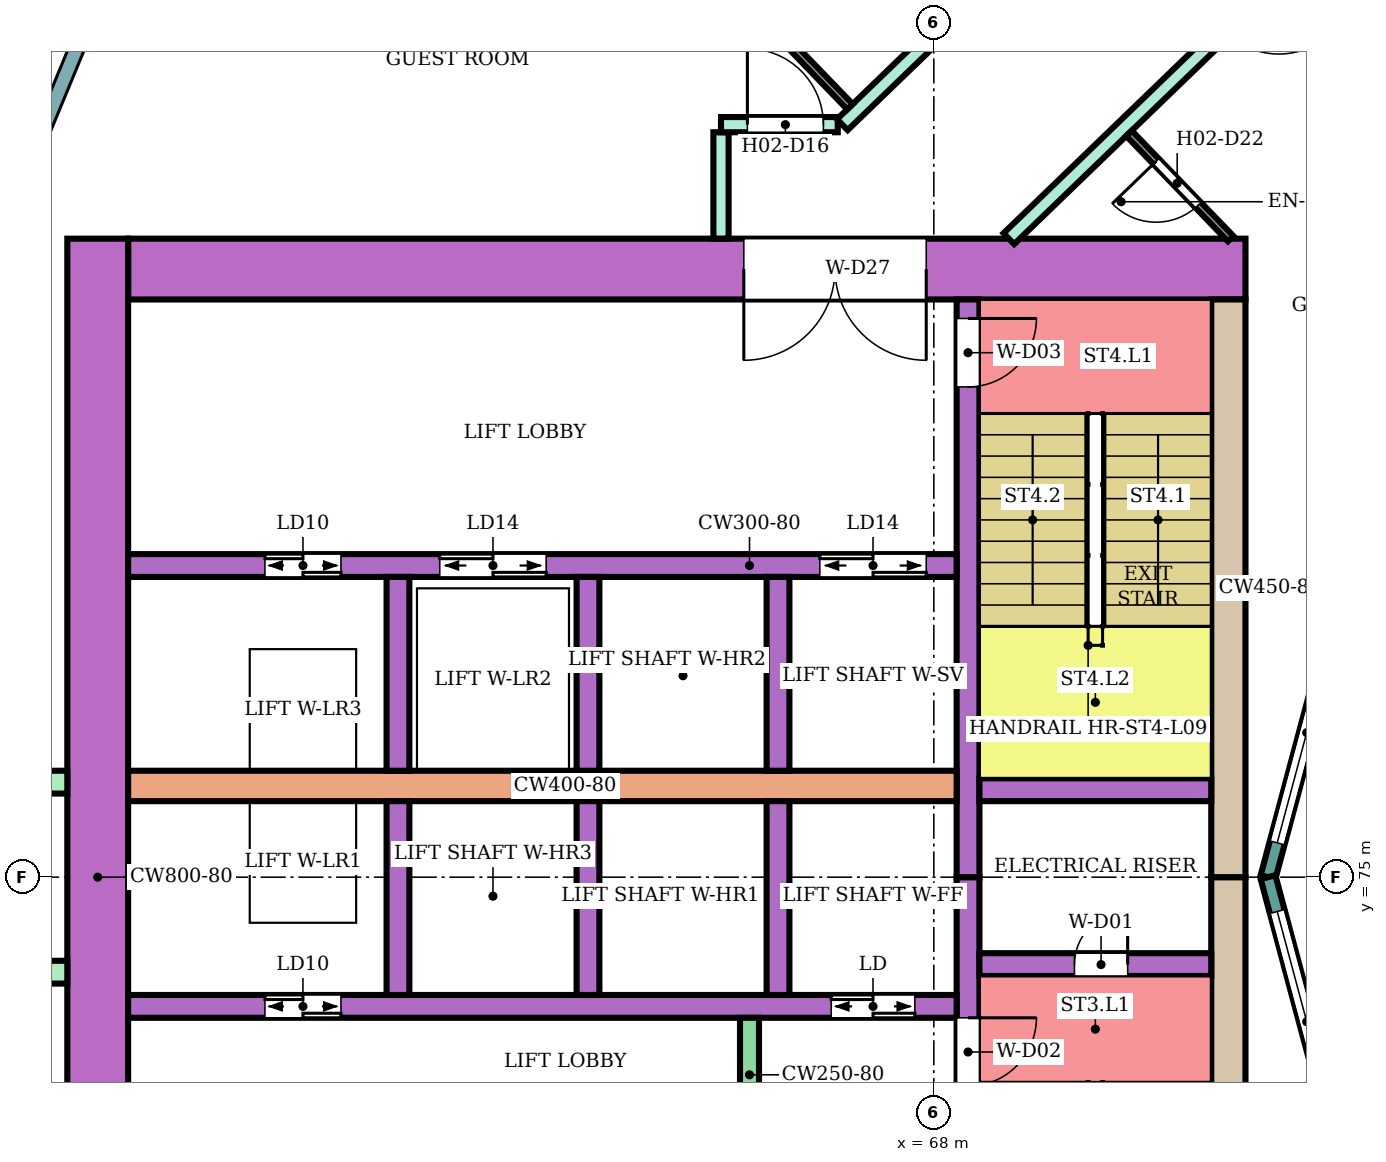
"""IFC4 building model, lengths in metres.
Left out: names, types, materials, properties, quantities, classifications, styles, units other than length and angle.
Written with IfcOpenShell. Run it as: python <this file> out.ifc"""

import sys

from ifc_helpers import new_model, si_unit, direction, frame, frame_2d, origin, place, context, subcontext, project, spatial, rectangle, extrude, element, fill, save


model = new_model("IFC4")
c1 = context("Model", 3, precision=1e-05, world=origin(), true_north=direction((0.0, 1.0)))
c2 = subcontext(c1, "Body", "Model", "MODEL_VIEW")
j1 = project(units=[si_unit("LENGTHUNIT", "METRE"), si_unit("PLANEANGLEUNIT", "RADIAN")], contexts=[c1])
p1 = place(None, origin())
s1 = spatial("IfcSite", under=j1, at=p1, CompositionType="ELEMENT")
p2 = place(p1, origin())
s2 = spatial("IfcBuilding", under=s1, at=p2, CompositionType="ELEMENT")
p3 = place(p2, frame((0.0, 0.0, 44.0)))
s3 = spatial("IfcBuildingStorey", under=s2, at=p3, CompositionType="ELEMENT", Elevation=44.0)
p4 = place(p3, frame((72.1, 83.0, 0.0), z_axis=(0.0, 0.0, 1.0), x_axis=(-1.0, 0.0, 0.0)))
e1 = element("IfcWall", 1, at=p4, inside=s3, PredefinedType="SHEAR", context=c2, shape_type="SweptSolid", body=[
    extrude(rectangle(XDim=14.7, YDim=0.8, at=frame_2d((7.35, 0.0))), origin(), (0.0, 0.0, 1.0), 3.48),
])
p5 = place(p4, frame((4.2, 0.0, 0.0)))
e2 = element("IfcOpeningElement", 2, at=p5, cuts=e1, PredefinedType="OPENING", context=c2, shape_type="SweptSolid", body=[
    extrude(rectangle(XDim=2.4, YDim=2.4, at=frame_2d((1.2, 1.2))), frame((0.0, 0.41, 0.0), z_axis=(0.0, -1.0, 0.0), x_axis=(1.0, 0.0, 0.0)), (0.0, 0.0, 1.0), 0.82),
])
for number, where, z_axis, x_axis in (
    (3, (71.875, 75.0, 0.0), (0.0, 0.0, 1.0), (0.0, -1.0, 0.0)),
    (4, (71.875, 82.6, 0.0), (0.0, 0.0, 1.0), (0.0, -1.0, 0.0)),
):
    element("IfcWall", number, at=place(p3, frame(where, z_axis=z_axis, x_axis=x_axis)), inside=s3, PredefinedType="SHEAR", context=c2, shape_type="SweptSolid", body=[
        extrude(rectangle(XDim=7.6, YDim=0.45, at=frame_2d((3.8, 0.0))), origin(), (0.0, 0.0, 1.0), 3.48),
    ])
p6 = place(p3, frame((57.0, 83.4, 0.0), z_axis=(0.0, 0.0, 1.0), x_axis=(0.0, -1.0, 0.0)))
e5 = element("IfcWall", 5, at=p6, inside=s3, PredefinedType="SHEAR", context=c2, shape_type="SweptSolid", body=[
    extrude(rectangle(XDim=16.8, YDim=0.8, at=frame_2d((8.4, 0.0))), origin(), (0.0, 0.0, 1.0), 3.48),
])
p7 = place(p3, frame((68.45, 75.0, 0.0), z_axis=(0.0, 0.0, 1.0), x_axis=(0.0, -1.0, 0.0)))
e6 = element("IfcWall", 6, at=p7, inside=s3, PredefinedType="SHEAR", context=c2, shape_type="SweptSolid", body=[
    extrude(rectangle(XDim=7.6, YDim=0.3, at=frame_2d((3.8, 0.0))), origin(), (0.0, 0.0, 1.0), 3.48),
])
p8 = place(p7, frame((1.85, 0.0, 0.0)))
e7 = element("IfcOpeningElement", 7, at=p8, cuts=e6, PredefinedType="OPENING", context=c2, shape_type="SweptSolid", body=[
    extrude(rectangle(XDim=0.9, YDim=2.1, at=frame_2d((0.45, 1.05))), frame((0.0, 0.16, 0.0), z_axis=(0.0, -1.0, 0.0), x_axis=(1.0, 0.0, 0.0)), (0.0, 0.0, 1.0), 0.32),
])
p9 = place(p3, frame((68.45, 82.6, 0.0), z_axis=(0.0, 0.0, 1.0), x_axis=(0.0, -1.0, 0.0)))
e8 = element("IfcWall", 8, at=p9, inside=s3, PredefinedType="SHEAR", context=c2, shape_type="SweptSolid", body=[
    extrude(rectangle(XDim=7.6, YDim=0.3, at=frame_2d((3.8, 0.0))), origin(), (0.0, 0.0, 1.0), 3.48),
])
p10 = place(p9, frame((0.25, 0.0, 0.0)))
e9 = element("IfcOpeningElement", 9, at=p10, cuts=e8, PredefinedType="OPENING", context=c2, shape_type="SweptSolid", body=[
    extrude(rectangle(XDim=0.9, YDim=2.1, at=frame_2d((0.45, 1.05))), frame((0.0, 0.16, 0.0), z_axis=(0.0, -1.0, 0.0), x_axis=(1.0, 0.0, 0.0)), (0.0, 0.0, 1.0), 0.32),
])
p11 = place(p3, frame((71.65, 73.85, 0.0), z_axis=(0.0, 0.0, 1.0), x_axis=(-1.0, 0.0, 0.0)))
e10 = element("IfcWall", 10, at=p11, inside=s3, PredefinedType="SHEAR", context=c2, shape_type="SweptSolid", body=[
    extrude(rectangle(XDim=3.05, YDim=0.3, at=frame_2d((1.525, 0.0))), origin(), (0.0, 0.0, 1.0), 3.48),
])
p12 = place(p11, frame((1.1, 0.0, 0.0)))
e11 = element("IfcOpeningElement", 11, at=p12, cuts=e10, PredefinedType="OPENING", context=c2, shape_type="SweptSolid", body=[
    extrude(rectangle(XDim=0.7, YDim=2.0, at=frame_2d((0.35, 1.0))), frame((0.0, 0.16, 0.0), z_axis=(0.0, -1.0, 0.0), x_axis=(1.0, 0.0, 0.0)), (0.0, 0.0, 1.0), 0.32),
])
p13 = place(p3, frame((71.65, 76.15, 0.0), z_axis=(0.0, 0.0, 1.0), x_axis=(-1.0, 0.0, 0.0)))
e12 = element("IfcWall", 12, at=p13, inside=s3, PredefinedType="SHEAR", context=c2, shape_type="SweptSolid", body=[
    extrude(rectangle(XDim=3.05, YDim=0.3, at=frame_2d((1.525, 0.0))), origin(), (0.0, 0.0, 1.0), 3.48),
])
p14 = place(p3, frame((68.3, 73.3, 0.0), z_axis=(0.0, 0.0, 1.0), x_axis=(-1.0, 0.0, 0.0)))
e13 = element("IfcWall", 13, at=p14, inside=s3, PredefinedType="SHEAR", context=c2, shape_type="SweptSolid", body=[
    extrude(rectangle(XDim=10.9, YDim=0.3, at=frame_2d((5.45, 0.0))), origin(), (0.0, 0.0, 1.0), 3.48),
])
p15 = place(p14, frame((0.55, 0.0, 0.0)))
e14 = element("IfcOpeningElement", 14, at=p15, cuts=e13, PredefinedType="OPENING", context=c2, shape_type="SweptSolid", body=[
    extrude(rectangle(XDim=1.1, YDim=2.1, at=frame_2d((0.55, 1.05))), frame((0.0, 0.16, 0.0), z_axis=(0.0, -1.0, 0.0), x_axis=(1.0, 0.0, 0.0)), (0.0, 0.0, 1.0), 0.32),
])
p16 = place(p14, frame((8.1, 0.0, 0.0)))
e15 = element("IfcOpeningElement", 15, at=p16, cuts=e13, PredefinedType="OPENING", context=c2, shape_type="SweptSolid", body=[
    extrude(rectangle(XDim=1.0, YDim=2.1, at=frame_2d((0.5, 1.05))), frame((0.0, 0.16, 0.0), z_axis=(0.0, -1.0, 0.0), x_axis=(1.0, 0.0, 0.0)), (0.0, 0.0, 1.0), 0.32),
])
p17 = place(p3, frame((68.3, 76.2, 0.0), z_axis=(0.0, 0.0, 1.0), x_axis=(-1.0, 0.0, 0.0)))
e16 = element("IfcWall", 16, at=p17, inside=s3, PredefinedType="SHEAR", context=c2, shape_type="SweptSolid", body=[
    extrude(rectangle(XDim=10.9, YDim=0.4, at=frame_2d((5.45, 0.0))), origin(), (0.0, 0.0, 1.0), 3.48),
])
p18 = place(p3, frame((68.3, 79.1, 0.0), z_axis=(0.0, 0.0, 1.0), x_axis=(-1.0, 0.0, 0.0)))
e17 = element("IfcWall", 17, at=p18, inside=s3, PredefinedType="SHEAR", context=c2, shape_type="SweptSolid", body=[
    extrude(rectangle(XDim=10.9, YDim=0.3, at=frame_2d((5.45, 0.0))), origin(), (0.0, 0.0, 1.0), 3.48),
])
p19 = place(p18, frame((0.4, 0.0, 0.0)))
e18 = element("IfcOpeningElement", 18, at=p19, cuts=e17, PredefinedType="OPENING", context=c2, shape_type="SweptSolid", body=[
    extrude(rectangle(XDim=1.4, YDim=2.1, at=frame_2d((0.7, 1.05))), frame((0.0, 0.16, 0.0), z_axis=(0.0, -1.0, 0.0), x_axis=(1.0, 0.0, 0.0)), (0.0, 0.0, 1.0), 0.32),
])
p20 = place(p18, frame((5.4, 0.0, 0.0)))
e19 = element("IfcOpeningElement", 19, at=p20, cuts=e17, PredefinedType="OPENING", context=c2, shape_type="SweptSolid", body=[
    extrude(rectangle(XDim=1.4, YDim=2.1, at=frame_2d((0.7, 1.05))), frame((0.0, 0.16, 0.0), z_axis=(0.0, -1.0, 0.0), x_axis=(1.0, 0.0, 0.0)), (0.0, 0.0, 1.0), 0.32),
])
p21 = place(p18, frame((8.1, 0.0, 0.0)))
e20 = element("IfcOpeningElement", 20, at=p21, cuts=e17, PredefinedType="OPENING", context=c2, shape_type="SweptSolid", body=[
    extrude(rectangle(XDim=1.0, YDim=2.1, at=frame_2d((0.5, 1.05))), frame((0.0, 0.16, 0.0), z_axis=(0.0, -1.0, 0.0), x_axis=(1.0, 0.0, 0.0)), (0.0, 0.0, 1.0), 0.32),
])
for number, where, z_axis, x_axis in (
    (21, (65.95, 76.0, 0.0), (0.0, 0.0, 1.0), (0.0, -1.0, 0.0)),
    (22, (63.45, 76.0, 0.0), (0.0, 0.0, 1.0), (0.0, -1.0, 0.0)),
    (23, (60.95, 76.0, 0.0), (0.0, 0.0, 1.0), (0.0, -1.0, 0.0)),
    (24, (65.95, 78.95, 0.0), (0.0, 0.0, 1.0), (0.0, -1.0, 0.0)),
    (25, (63.45, 78.95, 0.0), (0.0, 0.0, 1.0), (0.0, -1.0, 0.0)),
    (26, (60.95, 78.95, 0.0), (0.0, 0.0, 1.0), (0.0, -1.0, 0.0)),
):
    element("IfcWall", number, at=place(p3, frame(where, z_axis=z_axis, x_axis=x_axis)), inside=s3, PredefinedType="SHEAR", context=c2, shape_type="SweptSolid", body=[
        extrude(rectangle(XDim=2.55, YDim=0.3, at=frame_2d((1.275, 0.0))), origin(), (0.0, 0.0, 1.0), 3.48),
    ])
p22 = place(p3, frame((65.575, 73.15, 0.0), z_axis=(0.0, 0.0, 1.0), x_axis=(0.0, -1.0, 0.0)))
e27 = element("IfcWall", 27, at=p22, inside=s3, PredefinedType="SHEAR", context=c2, shape_type="SweptSolid", body=[
    extrude(rectangle(XDim=1.5, YDim=0.25, at=frame_2d((0.75, 0.0))), origin(), (0.0, 0.0, 1.0), 3.48),
])
for number, where, z_axis, x_axis in (
    (28, (56.6, 76.25, 0.0), (0.0, 0.0, 1.0), (-1.0, 0.0, 0.0)),
    (29, (56.6, 73.75, 0.0), (0.0, 0.0, 1.0), (-1.0, 0.0, 0.0)),
):
    element("IfcWall", number, at=place(p3, frame(where, z_axis=z_axis, x_axis=x_axis)), inside=s3, PredefinedType="NOTDEFINED", context=c2, shape_type="SweptSolid", body=[
        extrude(rectangle(XDim=2.416, YDim=0.3, at=frame_2d((1.208, 0.0))), origin(), (0.0, 0.0, 1.0), 3.8),
    ])
p23 = place(p3, frame((73.415, 78.802, 0.0), z_axis=(0.0, 0.0, 1.0), x_axis=(-0.258789828301, -0.965933654434, 0.0)))
e30 = element("IfcWall", 30, at=p23, inside=s3, PredefinedType="NOTDEFINED", context=c2, shape_type="SweptSolid", body=[
    extrude(rectangle(XDim=3.936, YDim=0.2, at=frame_2d((1.968, 0.0))), origin(), (0.0, 0.0, 1.0), 3.8),
])
p24 = place(p23, frame((0.468, 0.0, 0.9)))
e31 = element("IfcOpeningElement", 31, at=p24, cuts=e30, PredefinedType="OPENING", context=c2, shape_type="SweptSolid", body=[
    extrude(rectangle(XDim=3.0, YDim=2.3, at=frame_2d((1.5, 1.15))), frame((0.0, 0.11, 0.0), z_axis=(0.0, -1.0, 0.0), x_axis=(1.0, 0.0, 0.0)), (0.0, 0.0, 1.0), 0.22),
])
p25 = place(p3, frame((72.396, 75.0, 0.0), z_axis=(0.0, 0.0, 1.0), x_axis=(0.258789828301, -0.965933654434, 0.0)))
e32 = element("IfcWall", 32, at=p25, inside=s3, PredefinedType="NOTDEFINED", context=c2, shape_type="SweptSolid", body=[
    extrude(rectangle(XDim=3.936, YDim=0.2, at=frame_2d((1.968, 0.0))), origin(), (0.0, 0.0, 1.0), 3.8),
])
p26 = place(p25, frame((0.468, 0.0, 0.9)))
e33 = element("IfcOpeningElement", 33, at=p26, cuts=e32, PredefinedType="OPENING", context=c2, shape_type="SweptSolid", body=[
    extrude(rectangle(XDim=3.0, YDim=2.3, at=frame_2d((1.5, 1.15))), frame((0.0, 0.11, 0.0), z_axis=(0.0, -1.0, 0.0), x_axis=(1.0, 0.0, 0.0)), (0.0, 0.0, 1.0), 0.22),
])
p27 = place(p3, frame((65.2, 83.401, 0.0), z_axis=(0.0, 0.0, 1.0), x_axis=(0.0, 1.0, 0.0)))
e34 = element("IfcWall", 34, at=p27, inside=s3, PredefinedType="PARTITIONING", context=c2, shape_type="SweptSolid", body=[
    extrude(rectangle(XDim=1.399, YDim=0.2, at=frame_2d((0.7, 0.0))), origin(), (0.0, 0.0, 1.0), 3.35),
])
p28 = place(p3, frame((65.2, 84.9, 0.0), z_axis=(0.0, 0.0, 1.0), x_axis=(1.0, 0.0, 0.0)))
e35 = element("IfcWall", 35, at=p28, inside=s3, PredefinedType="PARTITIONING", context=c2, shape_type="SweptSolid", body=[
    extrude(rectangle(XDim=1.536, YDim=0.2, at=frame_2d((0.768, 0.0))), origin(), (0.0, 0.0, 1.0), 3.35),
])
p29 = place(p28, frame((0.347, 0.0, 0.0)))
e36 = element("IfcOpeningElement", 36, at=p29, cuts=e35, PredefinedType="OPENING", context=c2, shape_type="SweptSolid", body=[
    extrude(rectangle(XDim=1.0, YDim=2.1, at=frame_2d((0.5, 1.05))), frame((0.0, 0.11, 0.0), z_axis=(0.0, -1.0, 0.0), x_axis=(1.0, 0.0, 0.0)), (0.0, 0.0, 1.0), 0.22),
])
p30 = place(p3, frame((66.796, 84.9, 0.0), z_axis=(0.0, 0.0, 1.0), x_axis=(0.719690131178, 0.694295409092, 0.0)))
e37 = element("IfcWall", 37, at=p30, inside=s3, PredefinedType="PARTITIONING", context=c2, shape_type="SweptSolid", body=[
    extrude(rectangle(XDim=6.585, YDim=0.2, at=frame_2d((3.293, 0.0))), origin(), (0.0, 0.0, 1.0), 3.35),
])
p31 = place(p30, frame((2.867, 0.0, 0.0)))
e38 = element("IfcOpeningElement", 38, at=p31, cuts=e37, PredefinedType="OPENING", context=c2, shape_type="SweptSolid", body=[
    extrude(rectangle(XDim=1.0, YDim=2.1, at=frame_2d((0.5, 1.05))), frame((0.0, 0.11, 0.0), z_axis=(0.0, -1.0, 0.0), x_axis=(1.0, 0.0, 0.0)), (0.0, 0.0, 1.0), 0.22),
])
p32 = place(p3, frame((68.987, 83.4, 0.0), z_axis=(0.0, 0.0, 1.0), x_axis=(0.719591503389, 0.694397629784, 0.0)))
e39 = element("IfcWall", 39, at=p32, inside=s3, PredefinedType="PARTITIONING", context=c2, shape_type="SweptSolid", body=[
    extrude(rectangle(XDim=5.378, YDim=0.2, at=frame_2d((2.689, 0.0))), origin(), (0.0, 0.0, 1.0), 3.35),
])
p33 = place(p32, frame((3.938, 0.0, 0.0)))
e40 = element("IfcOpeningElement", 40, at=p33, cuts=e39, PredefinedType="OPENING", context=c2, shape_type="SweptSolid", body=[
    extrude(rectangle(XDim=1.0, YDim=2.1, at=frame_2d((0.5, 1.05))), frame((0.0, 0.11, 0.0), z_axis=(0.0, -1.0, 0.0), x_axis=(1.0, 0.0, 0.0)), (0.0, 0.0, 1.0), 0.22),
])
p34 = place(p3, frame((72.949, 87.215, 0.0), z_axis=(0.0, 0.0, 1.0), x_axis=(0.499890755261, -0.866088467077, 0.0)))
e41 = element("IfcWall", 41, at=p34, inside=s3, PredefinedType="PARTITIONING", context=c2, shape_type="SweptSolid", body=[
    extrude(rectangle(XDim=6.404, YDim=0.2, at=frame_2d((3.202, 0.0))), origin(), (0.0, 0.0, 1.0), 3.35),
])
p35 = place(p3, frame((65.022, 87.079, 0.0), z_axis=(0.0, 0.0, 1.0), x_axis=(0.694287838235, -0.719697434815, 0.0)))
e42 = element("IfcWall", 42, at=p35, inside=s3, PredefinedType="PARTITIONING", context=c2, shape_type="SweptSolid", body=[
    extrude(rectangle(XDim=2.7, YDim=0.1, at=frame_2d((1.35, 0.0))), origin(), (0.0, 0.0, 1.0), 3.35),
])
p36 = place(p35, frame((0.85, 0.0, 0.0)))
e43 = element("IfcOpeningElement", 43, at=p36, cuts=e42, PredefinedType="OPENING", context=c2, shape_type="SweptSolid", body=[
    extrude(rectangle(XDim=0.8, YDim=2.1, at=frame_2d((0.4, 1.05))), frame((0.0, 0.06, 0.0), z_axis=(0.0, -1.0, 0.0), x_axis=(1.0, 0.0, 0.0)), (0.0, 0.0, 1.0), 0.12),
])
p37 = place(p3, frame((70.567, 84.786, 0.0), z_axis=(0.0, 0.0, 1.0), x_axis=(0.694447472534, -0.719543402368, 0.0)))
e44 = element("IfcWall", 44, at=p37, inside=s3, PredefinedType="PARTITIONING", context=c2, shape_type="SweptSolid", body=[
    extrude(rectangle(XDim=1.926, YDim=0.1, at=frame_2d((0.963, 0.0))), origin(), (0.0, 0.0, 1.0), 3.35),
])
p38 = place(p37, frame((0.513, 0.0, 0.0)))
e45 = element("IfcOpeningElement", 45, at=p38, cuts=e44, PredefinedType="OPENING", context=c2, shape_type="SweptSolid", body=[
    extrude(rectangle(XDim=0.8, YDim=2.1, at=frame_2d((0.4, 1.05))), frame((0.0, 0.06, 0.0), z_axis=(0.0, -1.0, 0.0), x_axis=(1.0, 0.0, 0.0)), (0.0, 0.0, 1.0), 0.12),
])
p39 = place(p24, origin())
e46 = element("IfcWindow", 46, at=p39, inside=s3, PartitioningType="SINGLE_PANEL", PredefinedType="WINDOW", context=c2, shape_type="SweptSolid", body=[
    extrude(rectangle(XDim=3.0, YDim=2.3, at=frame_2d((1.5, 1.15))), frame((0.0, 0.03, 0.0), z_axis=(0.0, -1.0, 0.0), x_axis=(1.0, 0.0, 0.0)), (0.0, 0.0, 1.0), 0.06),
])
fill(e31, e46)
p40 = place(p26, origin())
e47 = element("IfcWindow", 47, at=p40, inside=s3, PartitioningType="SINGLE_PANEL", PredefinedType="WINDOW", context=c2, shape_type="SweptSolid", body=[
    extrude(rectangle(XDim=3.0, YDim=2.3, at=frame_2d((1.5, 1.15))), frame((0.0, 0.03, 0.0), z_axis=(0.0, -1.0, 0.0), x_axis=(1.0, 0.0, 0.0)), (0.0, 0.0, 1.0), 0.06),
])
fill(e33, e47)
p41 = place(p29, origin())
e48 = element("IfcDoor", 48, at=p41, inside=s3, OperationType="SINGLE_SWING_LEFT", PredefinedType="DOOR", context=c2, shape_type="SweptSolid", body=[
    extrude(rectangle(XDim=1.0, YDim=2.1, at=frame_2d((0.5, 1.05))), frame((0.0, 0.025, 0.0), z_axis=(0.0, -1.0, 0.0), x_axis=(1.0, 0.0, 0.0)), (0.0, 0.0, 1.0), 0.05),
])
fill(e36, e48)
p42 = place(p38, frame((0.8, 0.0, 0.0), z_axis=(0.0, 0.0, 1.0), x_axis=(-1.0, 0.0, 0.0)))
e49 = element("IfcDoor", 49, at=p42, inside=s3, OperationType="SINGLE_SWING_RIGHT", PredefinedType="DOOR", context=c2, shape_type="SweptSolid", body=[
    extrude(rectangle(XDim=0.8, YDim=2.1, at=frame_2d((0.4, 1.05))), frame((0.0, 0.025, 0.0), z_axis=(0.0, -1.0, 0.0), x_axis=(1.0, 0.0, 0.0)), (0.0, 0.0, 1.0), 0.05),
])
fill(e45, e49)
p43 = place(p12, frame((0.7, 0.0, 0.0), z_axis=(0.0, 0.0, 1.0), x_axis=(-1.0, 0.0, 0.0)))
e50 = element("IfcDoor", 50, at=p43, inside=s3, OperationType="SINGLE_SWING_RIGHT", PredefinedType="DOOR", context=c2, shape_type="SweptSolid", body=[
    extrude(rectangle(XDim=0.7, YDim=2.0, at=frame_2d((0.35, 1.0))), frame((0.0, 0.025, 0.0), z_axis=(0.0, -1.0, 0.0), x_axis=(1.0, 0.0, 0.0)), (0.0, 0.0, 1.0), 0.05),
])
fill(e11, e50)
p44 = place(p8, origin())
e51 = element("IfcDoor", 51, at=p44, inside=s3, OperationType="SINGLE_SWING_LEFT", PredefinedType="DOOR", context=c2, shape_type="SweptSolid", body=[
    extrude(rectangle(XDim=0.9, YDim=2.1, at=frame_2d((0.45, 1.05))), frame((0.0, 0.025, 0.0), z_axis=(0.0, -1.0, 0.0), x_axis=(1.0, 0.0, 0.0)), (0.0, 0.0, 1.0), 0.05),
])
fill(e7, e51)
p45 = place(p10, origin())
e52 = element("IfcDoor", 52, at=p45, inside=s3, OperationType="SINGLE_SWING_LEFT", PredefinedType="DOOR", context=c2, shape_type="SweptSolid", body=[
    extrude(rectangle(XDim=0.9, YDim=2.1, at=frame_2d((0.45, 1.05))), frame((0.0, 0.025, 0.0), z_axis=(0.0, -1.0, 0.0), x_axis=(1.0, 0.0, 0.0)), (0.0, 0.0, 1.0), 0.05),
])
fill(e9, e52)
p46 = place(p15, origin())
e53 = element("IfcDoor", 53, at=p46, inside=s3, OperationType="DOUBLE_DOOR_SLIDING", PredefinedType="DOOR", context=c2, shape_type="SweptSolid", body=[
    extrude(rectangle(XDim=1.1, YDim=2.1, at=frame_2d((0.55, 1.05))), frame((0.0, 0.025, 0.0), z_axis=(0.0, -1.0, 0.0), x_axis=(1.0, 0.0, 0.0)), (0.0, 0.0, 1.0), 0.05),
])
fill(e14, e53)
p47 = place(p16, origin())
e54 = element("IfcDoor", 54, at=p47, inside=s3, OperationType="DOUBLE_DOOR_SLIDING", PredefinedType="DOOR", context=c2, shape_type="SweptSolid", body=[
    extrude(rectangle(XDim=1.0, YDim=2.1, at=frame_2d((0.5, 1.05))), frame((0.0, 0.025, 0.0), z_axis=(0.0, -1.0, 0.0), x_axis=(1.0, 0.0, 0.0)), (0.0, 0.0, 1.0), 0.05),
])
fill(e15, e54)
p48 = place(p19, origin())
e55 = element("IfcDoor", 55, at=p48, inside=s3, OperationType="DOUBLE_DOOR_SLIDING", PredefinedType="DOOR", context=c2, shape_type="SweptSolid", body=[
    extrude(rectangle(XDim=1.4, YDim=2.1, at=frame_2d((0.7, 1.05))), frame((0.0, 0.025, 0.0), z_axis=(0.0, -1.0, 0.0), x_axis=(1.0, 0.0, 0.0)), (0.0, 0.0, 1.0), 0.05),
])
fill(e18, e55)
p49 = place(p20, origin())
e56 = element("IfcDoor", 56, at=p49, inside=s3, OperationType="DOUBLE_DOOR_SLIDING", PredefinedType="DOOR", context=c2, shape_type="SweptSolid", body=[
    extrude(rectangle(XDim=1.4, YDim=2.1, at=frame_2d((0.7, 1.05))), frame((0.0, 0.025, 0.0), z_axis=(0.0, -1.0, 0.0), x_axis=(1.0, 0.0, 0.0)), (0.0, 0.0, 1.0), 0.05),
])
fill(e19, e56)
p50 = place(p21, origin())
e57 = element("IfcDoor", 57, at=p50, inside=s3, OperationType="DOUBLE_DOOR_SLIDING", PredefinedType="DOOR", context=c2, shape_type="SweptSolid", body=[
    extrude(rectangle(XDim=1.0, YDim=2.1, at=frame_2d((0.5, 1.05))), frame((0.0, 0.025, 0.0), z_axis=(0.0, -1.0, 0.0), x_axis=(1.0, 0.0, 0.0)), (0.0, 0.0, 1.0), 0.05),
])
fill(e20, e57)
p51 = place(p5, origin())
e58 = element("IfcDoor", 58, at=p51, inside=s3, OperationType="DOUBLE_DOOR_SINGLE_SWING", PredefinedType="DOOR", context=c2, shape_type="SweptSolid", body=[
    extrude(rectangle(XDim=2.4, YDim=2.4, at=frame_2d((1.2, 1.2))), frame((0.0, 0.025, 0.0), z_axis=(0.0, -1.0, 0.0), x_axis=(1.0, 0.0, 0.0)), (0.0, 0.0, 1.0), 0.05),
])
fill(e2, e58)
save(model, sys.argv[1])
